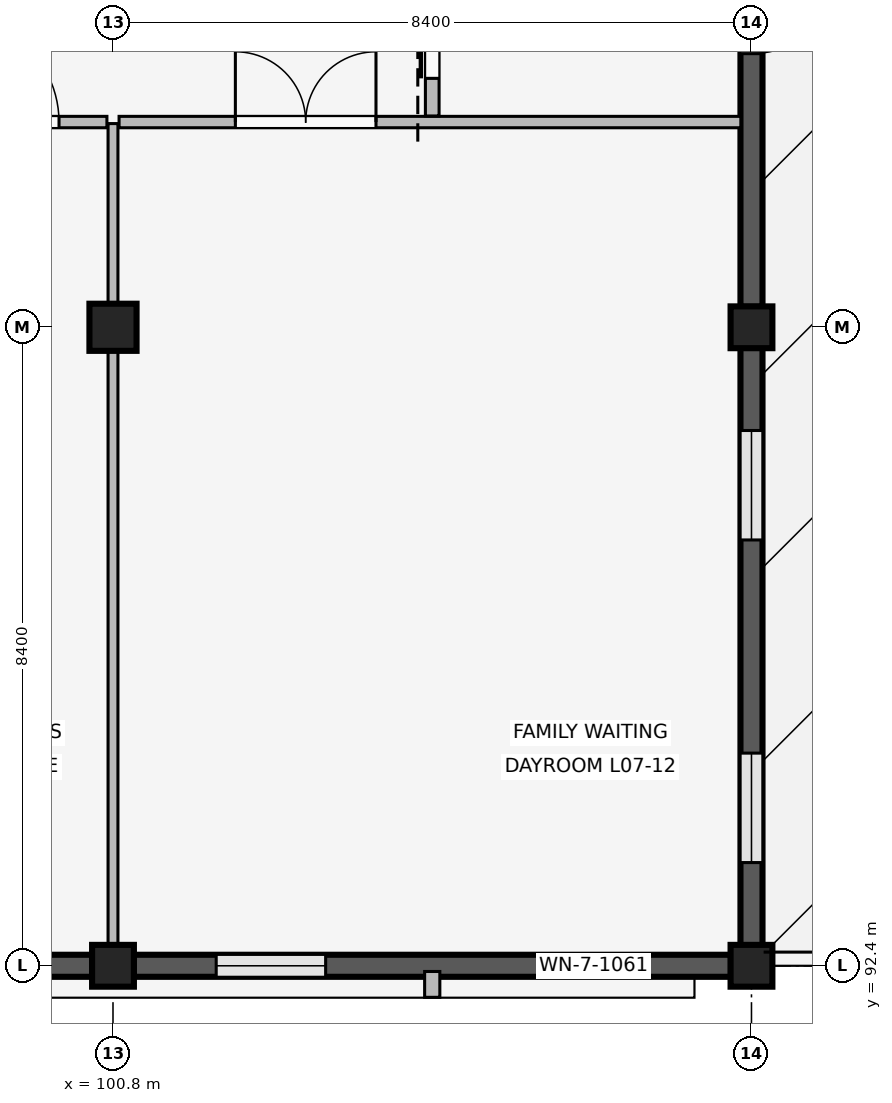
"""IFC4 building model, lengths in metres.
Left out: names, types, materials, properties, quantities, classifications, styles, units other than length and angle.
Written with IfcOpenShell. Run it as: python <this file> out.ifc"""

import sys

from ifc_helpers import new_model, si_unit, direction, frame, frame_2d, origin, origin_2d, place, context, subcontext, project, spatial, rectangle, extrude, element, fill, save


model = new_model("IFC4")
c1 = context("Model", 3, precision=1e-05, world=origin(), true_north=direction((0.0, 1.0)))
c2 = subcontext(c1, "Body", "Model", "MODEL_VIEW")
j1 = project(units=[si_unit("LENGTHUNIT", "METRE"), si_unit("PLANEANGLEUNIT", "RADIAN")], contexts=[c1])
p1 = place(None, origin())
s1 = spatial("IfcSite", under=j1, at=p1, CompositionType="ELEMENT")
p2 = place(p1, origin())
s2 = spatial("IfcBuilding", under=s1, at=p2, CompositionType="ELEMENT")
p3 = place(p2, frame((0.0, 0.0, 28.8)))
s3 = spatial("IfcBuildingStorey", under=s2, at=p3, CompositionType="ELEMENT", Elevation=28.8)
p4 = place(p3, frame((100.8, 92.4, 0.0), z_axis=(0.0, 0.0, 1.0), x_axis=(1.0, 0.0, 0.0)))
e1 = element("IfcColumn", 1, at=p4, inside=s3, PredefinedType="COLUMN", context=c2, shape_type="SweptSolid", body=[
    extrude(rectangle(XDim=0.55, YDim=0.55, at=origin_2d()), origin(), (0.0, 0.0, 1.0), 4.2),
])
p5 = place(p3, frame((100.8, 100.8, 0.0), z_axis=(0.0, 0.0, 1.0), x_axis=(1.0, 0.0, 0.0)))
e2 = element("IfcColumn", 2, at=p5, inside=s3, PredefinedType="COLUMN", context=c2, shape_type="SweptSolid", body=[
    extrude(rectangle(XDim=0.62, YDim=0.62, at=origin_2d()), origin(), (0.0, 0.0, 1.0), 4.2),
])
for number, where, z_axis, x_axis in (
    (3, (109.2, 92.4, 0.0), (0.0, 0.0, 1.0), (1.0, 0.0, 0.0)),
    (4, (109.2, 100.8, 0.0), (0.0, 0.0, 1.0), (1.0, 0.0, 0.0)),
):
    element("IfcColumn", number, at=place(p3, frame(where, z_axis=z_axis, x_axis=x_axis)), inside=s3, PredefinedType="COLUMN", context=c2, shape_type="SweptSolid", body=[
        extrude(rectangle(XDim=0.55, YDim=0.55, at=origin_2d()), origin(), (0.0, 0.0, 1.0), 4.2),
    ])
p6 = place(p3, frame((100.53, 92.4, 0.0), z_axis=(0.0, 0.0, 1.0), x_axis=(-1.0, 0.0, 0.0)))
e5 = element("IfcWall", 5, at=p6, inside=s3, PredefinedType="SOLIDWALL", context=c2, shape_type="SweptSolid", body=[
    extrude(rectangle(XDim=7.86, YDim=0.29, at=frame_2d((3.93, 0.0))), origin(), (0.0, 0.0, 1.0), 3.34),
])
p7 = place(p6, frame((0.998, 0.0, 0.85)))
e6 = element("IfcOpeningElement", 6, at=p7, cuts=e5, PredefinedType="OPENING", context=c2, shape_type="SweptSolid", body=[
    extrude(rectangle(XDim=1.62, YDim=1.8, at=frame_2d((0.81, 0.9))), frame((0.0, 0.155, 0.0), z_axis=(0.0, -1.0, 0.0), x_axis=(1.0, 0.0, 0.0)), (0.0, 0.0, 1.0), 0.31),
])
p8 = place(p6, frame((5.242, 0.0, 0.85)))
e7 = element("IfcOpeningElement", 7, at=p8, cuts=e5, PredefinedType="OPENING", context=c2, shape_type="SweptSolid", body=[
    extrude(rectangle(XDim=1.62, YDim=1.8, at=frame_2d((0.81, 0.9))), frame((0.0, 0.155, 0.0), z_axis=(0.0, -1.0, 0.0), x_axis=(1.0, 0.0, 0.0)), (0.0, 0.0, 1.0), 0.31),
])
p9 = place(p3, frame((108.93, 92.4, 0.0), z_axis=(0.0, 0.0, 1.0), x_axis=(-1.0, 0.0, 0.0)))
e8 = element("IfcWall", 8, at=p9, inside=s3, PredefinedType="SOLIDWALL", context=c2, shape_type="SweptSolid", body=[
    extrude(rectangle(XDim=7.86, YDim=0.29, at=frame_2d((3.93, 0.0))), origin(), (0.0, 0.0, 1.0), 3.34),
])
p10 = place(p9, frame((1.088, 0.0, 0.85)))
e9 = element("IfcOpeningElement", 9, at=p10, cuts=e8, PredefinedType="OPENING", context=c2, shape_type="SweptSolid", body=[
    extrude(rectangle(XDim=1.44, YDim=1.62, at=frame_2d((0.72, 0.81))), frame((0.0, 0.155, 0.0), z_axis=(0.0, -1.0, 0.0), x_axis=(1.0, 0.0, 0.0)), (0.0, 0.0, 1.0), 0.31),
])
p11 = place(p9, frame((5.332, 0.0, 0.85)))
e10 = element("IfcOpeningElement", 10, at=p11, cuts=e8, PredefinedType="OPENING", context=c2, shape_type="SweptSolid", body=[
    extrude(rectangle(XDim=1.44, YDim=1.62, at=frame_2d((0.72, 0.81))), frame((0.0, 0.155, 0.0), z_axis=(0.0, -1.0, 0.0), x_axis=(1.0, 0.0, 0.0)), (0.0, 0.0, 1.0), 0.31),
])
p12 = place(p3, frame((105.0, 92.325, 0.0), z_axis=(0.0, 0.0, 1.0), x_axis=(0.0, -1.0, 0.0)))
e11 = element("IfcWall", 11, at=p12, inside=s3, PredefinedType="ELEMENTEDWALL", context=c2, shape_type="SweptSolid", body=[
    extrude(rectangle(XDim=0.34, YDim=0.2, at=frame_2d((0.17, 0.0))), origin(), (0.0, 0.0, 1.0), 3.32),
])
p13 = place(p3, frame((109.2, 100.53, 0.0), z_axis=(0.0, 0.0, 1.0), x_axis=(0.0, -1.0, 0.0)))
e12 = element("IfcWall", 12, at=p13, inside=s3, PredefinedType="SOLIDWALL", context=c2, shape_type="SweptSolid", body=[
    extrude(rectangle(XDim=7.86, YDim=0.29, at=frame_2d((3.93, 0.0))), origin(), (0.0, 0.0, 1.0), 3.34),
])
p14 = place(p13, frame((1.088, 0.0, 0.85)))
e13 = element("IfcOpeningElement", 13, at=p14, cuts=e12, PredefinedType="OPENING", context=c2, shape_type="SweptSolid", body=[
    extrude(rectangle(XDim=1.44, YDim=1.62, at=frame_2d((0.72, 0.81))), frame((0.0, 0.155, 0.0), z_axis=(0.0, -1.0, 0.0), x_axis=(1.0, 0.0, 0.0)), (0.0, 0.0, 1.0), 0.31),
])
p15 = place(p13, frame((5.332, 0.0, 0.85)))
e14 = element("IfcOpeningElement", 14, at=p15, cuts=e12, PredefinedType="OPENING", context=c2, shape_type="SweptSolid", body=[
    extrude(rectangle(XDim=1.44, YDim=1.62, at=frame_2d((0.72, 0.81))), frame((0.0, 0.155, 0.0), z_axis=(0.0, -1.0, 0.0), x_axis=(1.0, 0.0, 0.0)), (0.0, 0.0, 1.0), 0.31),
])
p16 = place(p3, frame((109.2, 108.93, 0.0), z_axis=(0.0, 0.0, 1.0), x_axis=(0.0, -1.0, 0.0)))
e15 = element("IfcWall", 15, at=p16, inside=s3, PredefinedType="SOLIDWALL", context=c2, shape_type="SweptSolid", body=[
    extrude(rectangle(XDim=7.86, YDim=0.29, at=frame_2d((3.93, 0.0))), origin(), (0.0, 0.0, 1.0), 3.34),
])
p17 = place(p16, frame((3.33, 0.0, 0.0)))
e16 = element("IfcOpeningElement", 16, at=p17, cuts=e15, PredefinedType="OPENING", context=c2, shape_type="SweptSolid", body=[
    extrude(rectangle(XDim=1.2, YDim=2.25, at=frame_2d((0.6, 1.125))), frame((0.0, 0.155, 0.0), z_axis=(0.0, -1.0, 0.0), x_axis=(1.0, 0.0, 0.0)), (0.0, 0.0, 1.0), 0.31),
])
p18 = place(p3, frame((92.76, 103.5, 0.0), z_axis=(0.0, 0.0, 1.0), x_axis=(1.0, 0.0, 0.0)))
e17 = element("IfcWall", 17, at=p18, inside=s3, PredefinedType="PARTITIONING", context=c2, shape_type="SweptSolid", body=[
    extrude(rectangle(XDim=7.96, YDim=0.15, at=frame_2d((3.98, 0.0))), origin(), (0.0, 0.0, 1.0), 3.32),
])
p19 = place(p18, frame((2.25, 0.0, 0.0)))
e18 = element("IfcOpeningElement", 18, at=p19, cuts=e17, PredefinedType="OPENING", context=c2, shape_type="SweptSolid", body=[
    extrude(rectangle(XDim=1.38, YDim=2.25, at=frame_2d((0.69, 1.125))), frame((0.0, 0.085, 0.0), z_axis=(0.0, -1.0, 0.0), x_axis=(1.0, 0.0, 0.0)), (0.0, 0.0, 1.0), 0.17),
])
p20 = place(p18, frame((5.95, 0.0, 0.0)))
e19 = element("IfcOpeningElement", 19, at=p20, cuts=e17, PredefinedType="OPENING", context=c2, shape_type="SweptSolid", body=[
    extrude(rectangle(XDim=1.38, YDim=2.25, at=frame_2d((0.69, 1.125))), frame((0.0, 0.085, 0.0), z_axis=(0.0, -1.0, 0.0), x_axis=(1.0, 0.0, 0.0)), (0.0, 0.0, 1.0), 0.17),
])
p21 = place(p3, frame((100.8, 92.54, 0.0), z_axis=(0.0, 0.0, 1.0), x_axis=(0.0, 1.0, 0.0)))
e20 = element("IfcWall", 20, at=p21, inside=s3, PredefinedType="PARTITIONING", context=c2, shape_type="SweptSolid", body=[
    extrude(rectangle(XDim=10.94, YDim=0.13, at=frame_2d((5.47, 0.0))), origin(), (0.0, 0.0, 1.0), 3.32),
])
p22 = place(p3, frame((100.88, 103.5, 0.0), z_axis=(0.0, 0.0, 1.0), x_axis=(1.0, 0.0, 0.0)))
e21 = element("IfcWall", 21, at=p22, inside=s3, PredefinedType="PARTITIONING", context=c2, shape_type="SweptSolid", body=[
    extrude(rectangle(XDim=8.18, YDim=0.15, at=frame_2d((4.09, 0.0))), origin(), (0.0, 0.0, 1.0), 3.32),
])
p23 = place(p22, frame((1.53, 0.0, 0.0)))
e22 = element("IfcOpeningElement", 22, at=p23, cuts=e21, PredefinedType="OPENING", context=c2, shape_type="SweptSolid", body=[
    extrude(rectangle(XDim=1.85, YDim=2.3, at=frame_2d((0.925, 1.15))), frame((0.0, 0.085, 0.0), z_axis=(0.0, -1.0, 0.0), x_axis=(1.0, 0.0, 0.0)), (0.0, 0.0, 1.0), 0.17),
])
p24 = place(p3, frame((105.0, 103.58, 0.0), z_axis=(0.0, 0.0, 1.0), x_axis=(0.0, 1.0, 0.0)))
e23 = element("IfcWall", 23, at=p24, inside=s3, PredefinedType="PARTITIONING", context=c2, shape_type="SweptSolid", body=[
    extrude(rectangle(XDim=2.84, YDim=0.18, at=frame_2d((1.42, 0.0))), origin(), (0.0, 0.0, 1.0), 3.32),
])
p25 = place(p24, frame((0.495, 0.0, 0.0)))
e24 = element("IfcOpeningElement", 24, at=p25, cuts=e23, PredefinedType="OPENING", context=c2, shape_type="SweptSolid", body=[
    extrude(rectangle(XDim=1.85, YDim=2.3, at=frame_2d((0.925, 1.15))), frame((0.0, 0.1, 0.0), z_axis=(0.0, -1.0, 0.0), x_axis=(1.0, 0.0, 0.0)), (0.0, 0.0, 1.0), 0.2),
])
p26 = place(p10, origin())
e25 = element("IfcWindow", 25, at=p26, inside=s3, PartitioningType="SINGLE_PANEL", PredefinedType="WINDOW", context=c2, shape_type="SweptSolid", body=[
    extrude(rectangle(XDim=1.44, YDim=1.62, at=frame_2d((0.72, 0.81))), frame((0.0, 0.03, 0.0), z_axis=(0.0, -1.0, 0.0), x_axis=(1.0, 0.0, 0.0)), (0.0, 0.0, 1.0), 0.06),
])
fill(e9, e25)
p27 = place(p11, origin())
e26 = element("IfcWindow", 26, at=p27, inside=s3, PartitioningType="SINGLE_PANEL", PredefinedType="WINDOW", context=c2, shape_type="SweptSolid", body=[
    extrude(rectangle(XDim=1.44, YDim=1.62, at=frame_2d((0.72, 0.81))), frame((0.0, 0.03, 0.0), z_axis=(0.0, -1.0, 0.0), x_axis=(1.0, 0.0, 0.0)), (0.0, 0.0, 1.0), 0.06),
])
fill(e10, e26)
p28 = place(p14, origin())
e27 = element("IfcWindow", 27, at=p28, inside=s3, PartitioningType="SINGLE_PANEL", PredefinedType="WINDOW", context=c2, shape_type="SweptSolid", body=[
    extrude(rectangle(XDim=1.44, YDim=1.62, at=frame_2d((0.72, 0.81))), frame((0.0, 0.03, 0.0), z_axis=(0.0, -1.0, 0.0), x_axis=(1.0, 0.0, 0.0)), (0.0, 0.0, 1.0), 0.06),
])
fill(e13, e27)
p29 = place(p15, origin())
e28 = element("IfcWindow", 28, at=p29, inside=s3, PartitioningType="SINGLE_PANEL", PredefinedType="WINDOW", context=c2, shape_type="SweptSolid", body=[
    extrude(rectangle(XDim=1.44, YDim=1.62, at=frame_2d((0.72, 0.81))), frame((0.0, 0.03, 0.0), z_axis=(0.0, -1.0, 0.0), x_axis=(1.0, 0.0, 0.0)), (0.0, 0.0, 1.0), 0.06),
])
fill(e14, e28)
p30 = place(p17, origin())
e29 = element("IfcDoor", 29, at=p30, inside=s3, OperationType="SINGLE_SWING_LEFT", PredefinedType="DOOR", context=c2, shape_type="SweptSolid", body=[
    extrude(rectangle(XDim=1.2, YDim=2.25, at=frame_2d((0.6, 1.125))), frame((0.0, 0.025, 0.0), z_axis=(0.0, -1.0, 0.0), x_axis=(1.0, 0.0, 0.0)), (0.0, 0.0, 1.0), 0.05),
])
fill(e16, e29)
p31 = place(p20, origin())
e30 = element("IfcDoor", 30, at=p31, inside=s3, OperationType="SINGLE_SWING_LEFT", PredefinedType="DOOR", context=c2, shape_type="SweptSolid", body=[
    extrude(rectangle(XDim=1.38, YDim=2.25, at=frame_2d((0.69, 1.125))), frame((0.0, 0.025, 0.0), z_axis=(0.0, -1.0, 0.0), x_axis=(1.0, 0.0, 0.0)), (0.0, 0.0, 1.0), 0.05),
])
fill(e19, e30)
p32 = place(p23, origin())
e31 = element("IfcDoor", 31, at=p32, inside=s3, OperationType="DOUBLE_SWING_LEFT", PredefinedType="DOOR", context=c2, shape_type="SweptSolid", body=[
    extrude(rectangle(XDim=1.85, YDim=2.3, at=frame_2d((0.925, 1.15))), frame((0.0, 0.025, 0.0), z_axis=(0.0, -1.0, 0.0), x_axis=(1.0, 0.0, 0.0)), (0.0, 0.0, 1.0), 0.05),
])
fill(e22, e31)
p33 = place(p25, origin())
e32 = element("IfcDoor", 32, at=p33, inside=s3, OperationType="SLIDING_TO_LEFT", PredefinedType="DOOR", context=c2, shape_type="SweptSolid", body=[
    extrude(rectangle(XDim=1.85, YDim=2.3, at=frame_2d((0.925, 1.15))), frame((0.0, 0.025, 0.0), z_axis=(0.0, -1.0, 0.0), x_axis=(1.0, 0.0, 0.0)), (0.0, 0.0, 1.0), 0.05),
])
fill(e24, e32)
save(model, sys.argv[1])
